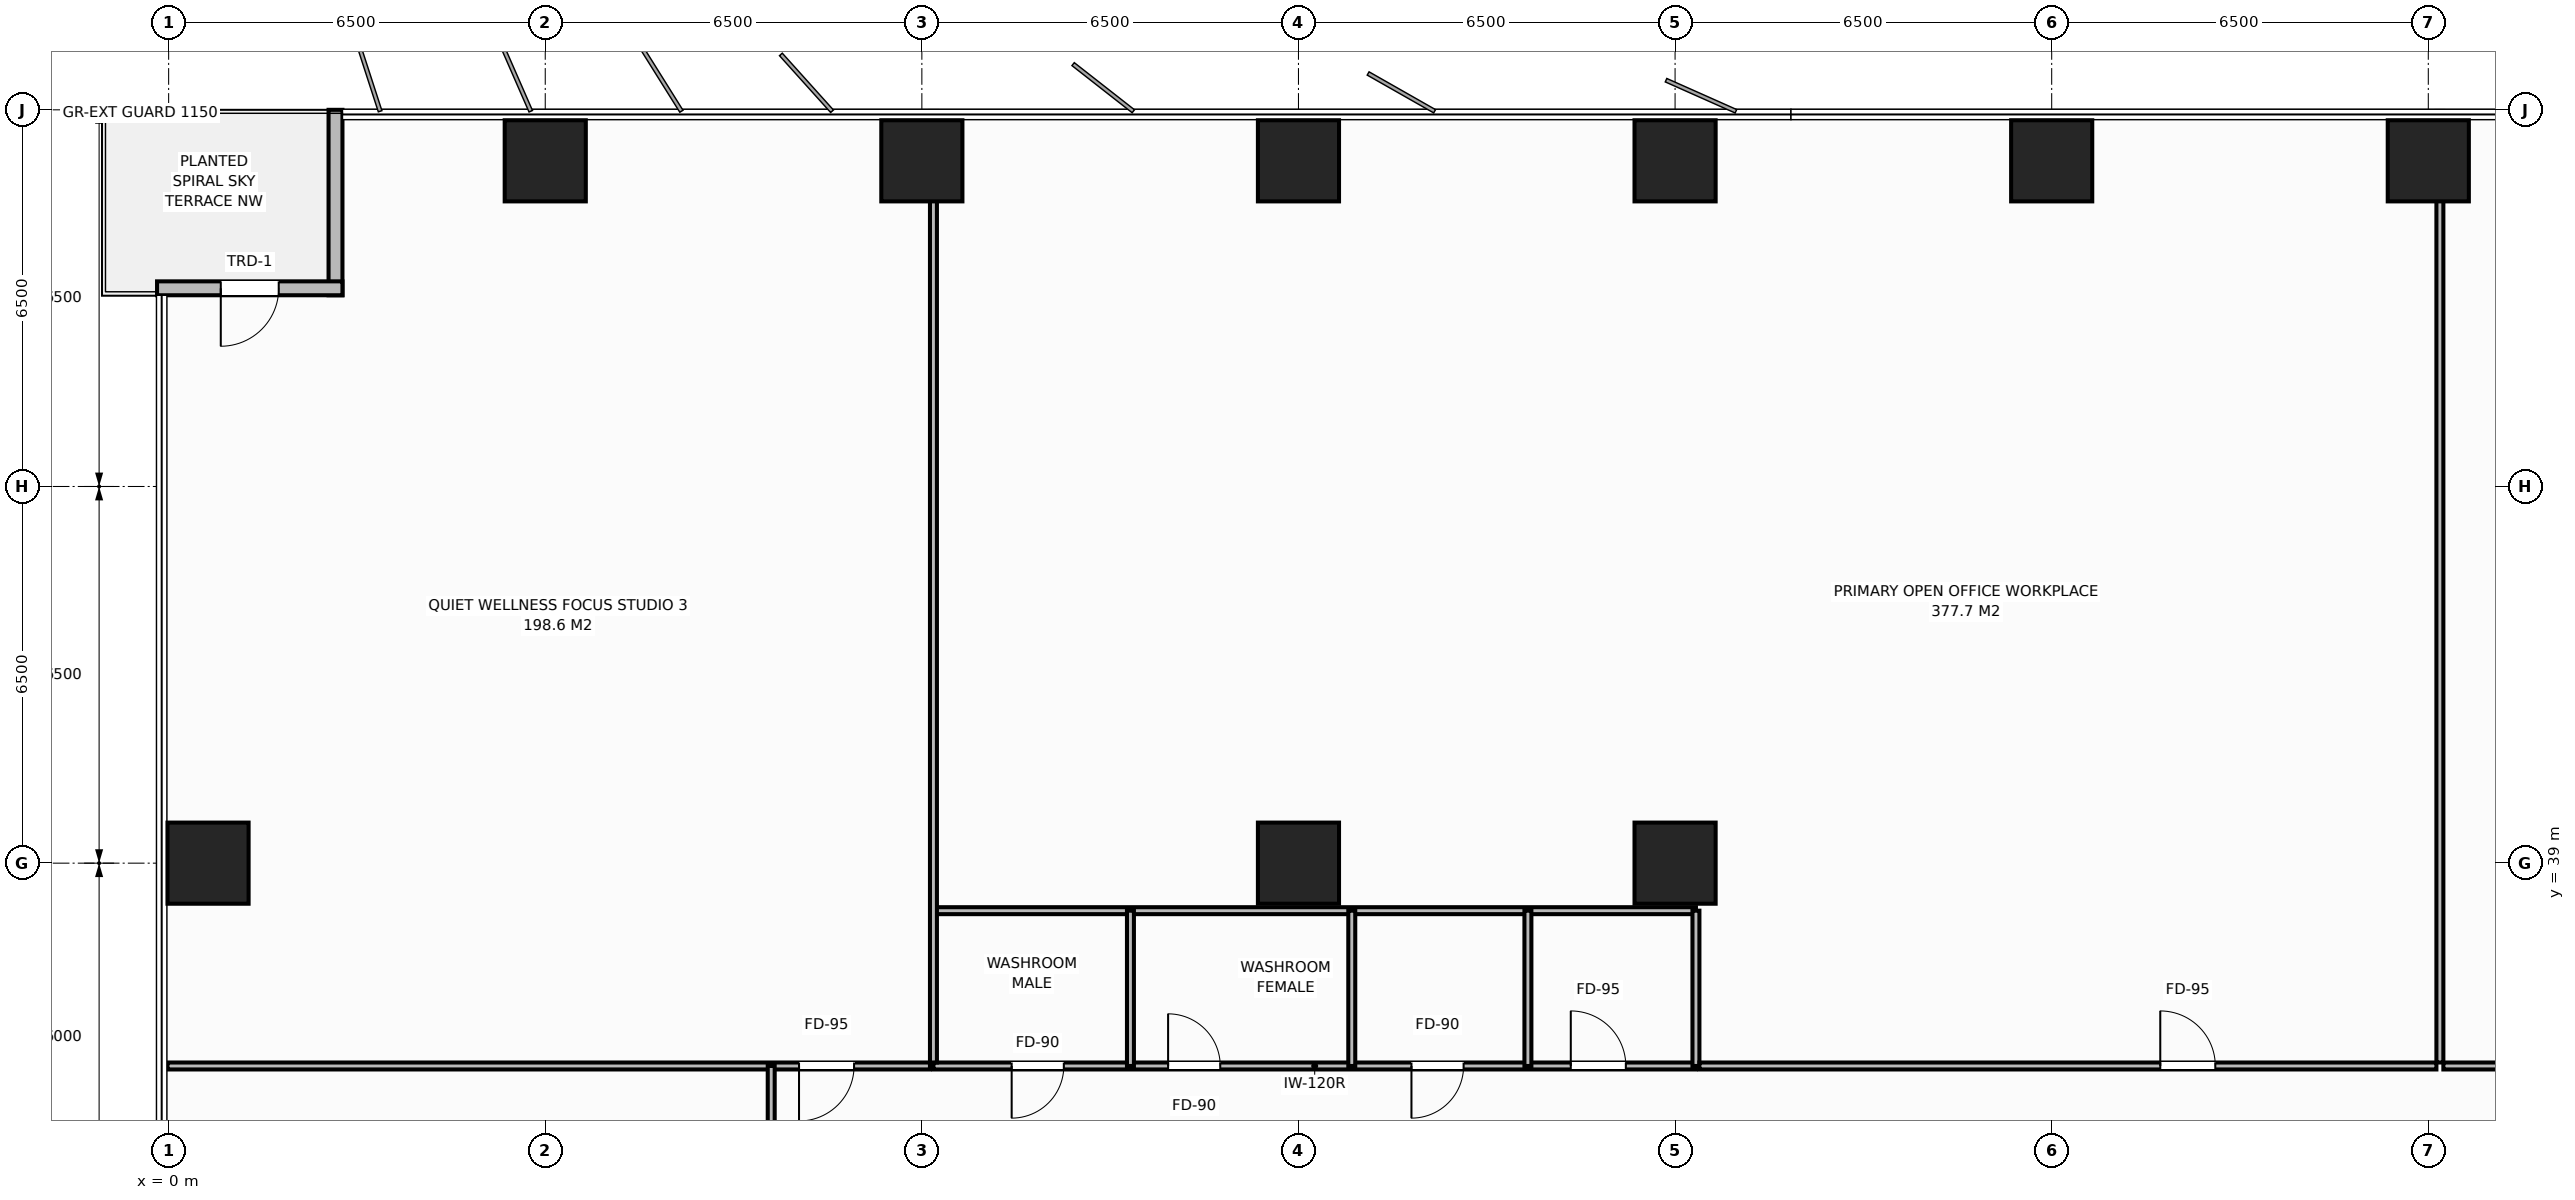
"""IFC4 building model, lengths in metres.
Left out: names, types, materials, properties, quantities, classifications, styles, units other than length and angle.
Written with IfcOpenShell. Run it as: python <this file> out.ifc"""

import sys

from ifc_helpers import new_model, si_unit, direction, frame, frame_2d, origin, origin_2d, place, context, subcontext, project, spatial, rectangle, extrude, element, fill, save


model = new_model("IFC4")
c1 = context("Model", 3, precision=1e-05, world=origin(), true_north=direction((0.0, 1.0)))
c2 = subcontext(c1, "Body", "Model", "MODEL_VIEW")
j1 = project(units=[si_unit("LENGTHUNIT", "METRE"), si_unit("PLANEANGLEUNIT", "RADIAN")], contexts=[c1])
p1 = place(None, origin())
s1 = spatial("IfcSite", under=j1, at=p1, CompositionType="ELEMENT")
p2 = place(p1, origin())
s2 = spatial("IfcBuilding", under=s1, at=p2, CompositionType="ELEMENT")
p3 = place(p2, frame((0.0, 0.0, 77.2)))
s3 = spatial("IfcBuildingStorey", under=s2, at=p3, CompositionType="ELEMENT", Elevation=77.2)
for number, where, z_axis, x_axis in (
    (1, (19.5, 39.0, 0.0), (0.0, 0.0, 1.0), (1.0, 0.0, 0.0)),
    (2, (26.0, 39.0, 0.0), (0.0, 0.0, 1.0), (1.0, 0.0, 0.0)),
    (3, (6.5, 51.12, 0.0), (0.0, 0.0, 1.0), (1.0, 0.0, 0.0)),
    (4, (13.0, 51.12, 0.0), (0.0, 0.0, 1.0), (1.0, 0.0, 0.0)),
    (5, (19.5, 51.12, 0.0), (0.0, 0.0, 1.0), (1.0, 0.0, 0.0)),
    (6, (26.0, 51.12, 0.0), (0.0, 0.0, 1.0), (1.0, 0.0, 0.0)),
    (7, (32.5, 51.12, 0.0), (0.0, 0.0, 1.0), (1.0, 0.0, 0.0)),
    (8, (39.0, 51.12, 0.0), (0.0, 0.0, 1.0), (1.0, 0.0, 0.0)),
    (9, (0.68, 39.0, 0.0), (0.0, 0.0, 1.0), (1.0, 0.0, 0.0)),
):
    element("IfcColumn", number, at=place(p3, frame(where, z_axis=z_axis, x_axis=x_axis)), inside=s3, PredefinedType="COLUMN", context=c2, shape_type="SweptSolid", body=[
        extrude(rectangle(XDim=1.4, YDim=1.4, at=origin_2d()), origin(), (0.0, 0.0, 1.0), 3.8),
    ])
p4 = place(p3, frame((2.88, 48.8, 0.0), z_axis=(0.0, 0.0, 1.0), x_axis=(0.0, 1.0, 0.0)))
e10 = element("IfcWall", 10, at=p4, inside=s3, PredefinedType="STANDARD", context=c2, shape_type="SweptSolid", body=[
    extrude(rectangle(XDim=3.2, YDim=0.24, at=frame_2d((1.6, 0.0))), origin(), (0.0, 0.0, 1.0), 3.52),
])
p5 = place(p3, frame((-0.2, 48.92, 0.0), z_axis=(0.0, 0.0, 1.0), x_axis=(1.0, 0.0, 0.0)))
e11 = element("IfcWall", 11, at=p5, inside=s3, PredefinedType="STANDARD", context=c2, shape_type="SweptSolid", body=[
    extrude(rectangle(XDim=3.2, YDim=0.24, at=frame_2d((1.6, 0.0))), origin(), (0.0, 0.0, 1.0), 3.52),
])
p6 = place(p5, frame((1.1, 0.0, 0.0)))
e12 = element("IfcOpeningElement", 12, at=p6, cuts=e11, PredefinedType="OPENING", context=c2, shape_type="SweptSolid", body=[
    extrude(rectangle(XDim=1.0, YDim=2.2, at=frame_2d((0.5, 1.1))), frame((0.0, 0.13, 0.0), z_axis=(0.0, -1.0, 0.0), x_axis=(1.0, 0.0, 0.0)), (0.0, 0.0, 1.0), 0.26),
])
p7 = place(p3, frame((13.2, 35.5, 0.0), z_axis=(0.0, 0.0, 1.0), x_axis=(1.0, 0.0, 0.0)))
e13 = element("IfcWall", 13, at=p7, inside=s3, PredefinedType="PARTITIONING", context=c2, shape_type="SweptSolid", body=[
    extrude(rectangle(XDim=13.16, YDim=0.12, at=frame_2d((6.58, 0.0))), origin(), (0.0, 0.0, 1.0), 3.52),
])
p8 = place(p7, frame((1.35, 0.0, 0.0)))
e14 = element("IfcOpeningElement", 14, at=p8, cuts=e13, PredefinedType="OPENING", context=c2, shape_type="SweptSolid", body=[
    extrude(rectangle(XDim=0.9, YDim=2.15, at=frame_2d((0.45, 1.075))), frame((0.0, 0.07, 0.0), z_axis=(0.0, -1.0, 0.0), x_axis=(1.0, 0.0, 0.0)), (0.0, 0.0, 1.0), 0.14),
])
p9 = place(p7, frame((4.05, 0.0, 0.0)))
e15 = element("IfcOpeningElement", 15, at=p9, cuts=e13, PredefinedType="OPENING", context=c2, shape_type="SweptSolid", body=[
    extrude(rectangle(XDim=0.9, YDim=2.15, at=frame_2d((0.45, 1.075))), frame((0.0, 0.07, 0.0), z_axis=(0.0, -1.0, 0.0), x_axis=(1.0, 0.0, 0.0)), (0.0, 0.0, 1.0), 0.14),
])
p10 = place(p7, frame((8.25, 0.0, 0.0)))
e16 = element("IfcOpeningElement", 16, at=p10, cuts=e13, PredefinedType="OPENING", context=c2, shape_type="SweptSolid", body=[
    extrude(rectangle(XDim=0.9, YDim=2.15, at=frame_2d((0.45, 1.075))), frame((0.0, 0.07, 0.0), z_axis=(0.0, -1.0, 0.0), x_axis=(1.0, 0.0, 0.0)), (0.0, 0.0, 1.0), 0.14),
])
p11 = place(p7, frame((11.0, 0.0, 0.0)))
e17 = element("IfcOpeningElement", 17, at=p11, cuts=e13, PredefinedType="OPENING", context=c2, shape_type="SweptSolid", body=[
    extrude(rectangle(XDim=0.95, YDim=2.15, at=frame_2d((0.475, 1.075))), frame((0.0, 0.07, 0.0), z_axis=(0.0, -1.0, 0.0), x_axis=(1.0, 0.0, 0.0)), (0.0, 0.0, 1.0), 0.14),
])
p12 = place(p3, frame((13.2, 38.18, 0.0), z_axis=(0.0, 0.0, 1.0), x_axis=(1.0, 0.0, 0.0)))
e18 = element("IfcWall", 18, at=p12, inside=s3, PredefinedType="PARTITIONING", context=c2, shape_type="SweptSolid", body=[
    extrude(rectangle(XDim=13.16, YDim=0.12, at=frame_2d((6.58, 0.0))), origin(), (0.0, 0.0, 1.0), 3.52),
])
for number, where, z_axis, x_axis in (
    (19, (16.6, 35.5, 0.0), (0.0, 0.0, 1.0), (0.0, 1.0, 0.0)),
    (20, (20.42, 35.5, 0.0), (0.0, 0.0, 1.0), (0.0, 1.0, 0.0)),
    (21, (23.46, 35.5, 0.0), (0.0, 0.0, 1.0), (0.0, 1.0, 0.0)),
    (22, (26.36, 35.5, 0.0), (0.0, 0.0, 1.0), (0.0, 1.0, 0.0)),
):
    element("IfcWall", number, at=place(p3, frame(where, z_axis=z_axis, x_axis=x_axis)), inside=s3, PredefinedType="PARTITIONING", context=c2, shape_type="SweptSolid", body=[
        extrude(rectangle(XDim=2.68, YDim=0.12, at=frame_2d((1.34, 0.0))), origin(), (0.0, 0.0, 1.0), 3.52),
    ])
p13 = place(p3, frame((13.2, 35.56, 0.0), z_axis=(0.0, 0.0, 1.0), x_axis=(0.0, 1.0, 0.0)))
e23 = element("IfcWall", 23, at=p13, inside=s3, PredefinedType="PARTITIONING", context=c2, shape_type="SweptSolid", body=[
    extrude(rectangle(XDim=16.42, YDim=0.12, at=frame_2d((8.21, 0.0))), origin(), (0.0, 0.0, 1.0), 2.72),
])
p14 = place(p3, frame((-0.02, 35.5, 0.0), z_axis=(0.0, 0.0, 1.0), x_axis=(1.0, 0.0, 0.0)))
e24 = element("IfcWall", 24, at=p14, inside=s3, PredefinedType="PARTITIONING", context=c2, shape_type="SweptSolid", body=[
    extrude(rectangle(XDim=13.16, YDim=0.12, at=frame_2d((6.58, 0.0))), origin(), (0.0, 0.0, 1.0), 3.52),
])
p15 = place(p14, frame((10.9, 0.0, 0.0)))
e25 = element("IfcOpeningElement", 25, at=p15, cuts=e24, PredefinedType="OPENING", context=c2, shape_type="SweptSolid", body=[
    extrude(rectangle(XDim=0.95, YDim=2.15, at=frame_2d((0.475, 1.075))), frame((0.0, 0.07, 0.0), z_axis=(0.0, -1.0, 0.0), x_axis=(1.0, 0.0, 0.0)), (0.0, 0.0, 1.0), 0.14),
])
p16 = place(p3, frame((39.2, 35.56, 0.0), z_axis=(0.0, 0.0, 1.0), x_axis=(0.0, 1.0, 0.0)))
e26 = element("IfcWall", 26, at=p16, inside=s3, PredefinedType="PARTITIONING", context=c2, shape_type="SweptSolid", body=[
    extrude(rectangle(XDim=16.42, YDim=0.12, at=frame_2d((8.21, 0.0))), origin(), (0.0, 0.0, 1.0), 2.72),
])
p17 = place(p3, frame((26.42, 35.5, 0.0), z_axis=(0.0, 0.0, 1.0), x_axis=(1.0, 0.0, 0.0)))
e27 = element("IfcWall", 27, at=p17, inside=s3, PredefinedType="PARTITIONING", context=c2, shape_type="SweptSolid", body=[
    extrude(rectangle(XDim=12.72, YDim=0.12, at=frame_2d((6.36, 0.0))), origin(), (0.0, 0.0, 1.0), 3.52),
])
p18 = place(p17, frame((7.954, 0.0, 0.0)))
e28 = element("IfcOpeningElement", 28, at=p18, cuts=e27, PredefinedType="OPENING", context=c2, shape_type="SweptSolid", body=[
    extrude(rectangle(XDim=0.95, YDim=2.15, at=frame_2d((0.475, 1.075))), frame((0.0, 0.07, 0.0), z_axis=(0.0, -1.0, 0.0), x_axis=(1.0, 0.0, 0.0)), (0.0, 0.0, 1.0), 0.14),
])
p19 = place(p3, frame((39.26, 35.5, 0.0), z_axis=(0.0, 0.0, 1.0), x_axis=(1.0, 0.0, 0.0)))
e29 = element("IfcWall", 29, at=p19, inside=s3, PredefinedType="PARTITIONING", context=c2, shape_type="SweptSolid", body=[
    extrude(rectangle(XDim=5.819, YDim=0.12, at=frame_2d((2.909, 0.0))), origin(), (0.0, 0.0, 1.0), 3.52),
])
p20 = place(p19, frame((2.434, 0.0, 0.0)))
e30 = element("IfcOpeningElement", 30, at=p20, cuts=e29, PredefinedType="OPENING", context=c2, shape_type="SweptSolid", body=[
    extrude(rectangle(XDim=0.95, YDim=2.15, at=frame_2d((0.475, 1.075))), frame((0.0, 0.07, 0.0), z_axis=(0.0, -1.0, 0.0), x_axis=(1.0, 0.0, 0.0)), (0.0, 0.0, 1.0), 0.14),
])
p21 = place(p3, frame((10.4, 27.05, 0.0), z_axis=(0.0, 0.0, 1.0), x_axis=(0.0, 1.0, 0.0)))
e31 = element("IfcWall", 31, at=p21, inside=s3, PredefinedType="PARTITIONING", context=c2, shape_type="SweptSolid", body=[
    extrude(rectangle(XDim=8.45, YDim=0.12, at=frame_2d((4.225, 0.0))), origin(), (0.0, 0.0, 1.0), 3.52),
])
p22 = place(p21, frame((2.7, 0.0, 0.0)))
e32 = element("IfcOpeningElement", 32, at=p22, cuts=e31, PredefinedType="OPENING", context=c2, shape_type="SweptSolid", body=[
    extrude(rectangle(XDim=0.95, YDim=2.15, at=frame_2d((0.475, 1.075))), frame((0.0, 0.07, 0.0), z_axis=(0.0, -1.0, 0.0), x_axis=(1.0, 0.0, 0.0)), (0.0, 0.0, 1.0), 0.14),
])
p23 = place(p6, origin())
e33 = element("IfcDoor", 33, at=p23, inside=s3, OperationType="SINGLE_SWING_RIGHT", PredefinedType="DOOR", context=c2, shape_type="SweptSolid", body=[
    extrude(rectangle(XDim=1.0, YDim=2.2, at=frame_2d((0.5, 1.1))), frame((0.0, 0.025, 0.0), z_axis=(0.0, -1.0, 0.0), x_axis=(1.0, 0.0, 0.0)), (0.0, 0.0, 1.0), 0.05),
])
fill(e12, e33)
p24 = place(p8, origin())
e34 = element("IfcDoor", 34, at=p24, inside=s3, OperationType="SINGLE_SWING_RIGHT", PredefinedType="DOOR", context=c2, shape_type="SweptSolid", body=[
    extrude(rectangle(XDim=0.9, YDim=2.15, at=frame_2d((0.45, 1.075))), frame((0.0, 0.025, 0.0), z_axis=(0.0, -1.0, 0.0), x_axis=(1.0, 0.0, 0.0)), (0.0, 0.0, 1.0), 0.05),
])
fill(e14, e34)
p25 = place(p9, origin())
e35 = element("IfcDoor", 35, at=p25, inside=s3, OperationType="SINGLE_SWING_LEFT", PredefinedType="DOOR", context=c2, shape_type="SweptSolid", body=[
    extrude(rectangle(XDim=0.9, YDim=2.15, at=frame_2d((0.45, 1.075))), frame((0.0, 0.025, 0.0), z_axis=(0.0, -1.0, 0.0), x_axis=(1.0, 0.0, 0.0)), (0.0, 0.0, 1.0), 0.05),
])
fill(e15, e35)
p26 = place(p10, origin())
e36 = element("IfcDoor", 36, at=p26, inside=s3, OperationType="SINGLE_SWING_RIGHT", PredefinedType="DOOR", context=c2, shape_type="SweptSolid", body=[
    extrude(rectangle(XDim=0.9, YDim=2.15, at=frame_2d((0.45, 1.075))), frame((0.0, 0.025, 0.0), z_axis=(0.0, -1.0, 0.0), x_axis=(1.0, 0.0, 0.0)), (0.0, 0.0, 1.0), 0.05),
])
fill(e16, e36)
p27 = place(p11, origin())
e37 = element("IfcDoor", 37, at=p27, inside=s3, OperationType="SINGLE_SWING_LEFT", PredefinedType="DOOR", context=c2, shape_type="SweptSolid", body=[
    extrude(rectangle(XDim=0.95, YDim=2.15, at=frame_2d((0.475, 1.075))), frame((0.0, 0.025, 0.0), z_axis=(0.0, -1.0, 0.0), x_axis=(1.0, 0.0, 0.0)), (0.0, 0.0, 1.0), 0.05),
])
fill(e17, e37)
p28 = place(p15, origin())
e38 = element("IfcDoor", 38, at=p28, inside=s3, OperationType="SINGLE_SWING_RIGHT", PredefinedType="DOOR", context=c2, shape_type="SweptSolid", body=[
    extrude(rectangle(XDim=0.95, YDim=2.15, at=frame_2d((0.475, 1.075))), frame((0.0, 0.025, 0.0), z_axis=(0.0, -1.0, 0.0), x_axis=(1.0, 0.0, 0.0)), (0.0, 0.0, 1.0), 0.05),
])
fill(e25, e38)
p29 = place(p18, origin())
e39 = element("IfcDoor", 39, at=p29, inside=s3, OperationType="SINGLE_SWING_LEFT", PredefinedType="DOOR", context=c2, shape_type="SweptSolid", body=[
    extrude(rectangle(XDim=0.95, YDim=2.15, at=frame_2d((0.475, 1.075))), frame((0.0, 0.025, 0.0), z_axis=(0.0, -1.0, 0.0), x_axis=(1.0, 0.0, 0.0)), (0.0, 0.0, 1.0), 0.05),
])
fill(e28, e39)
save(model, sys.argv[1])
